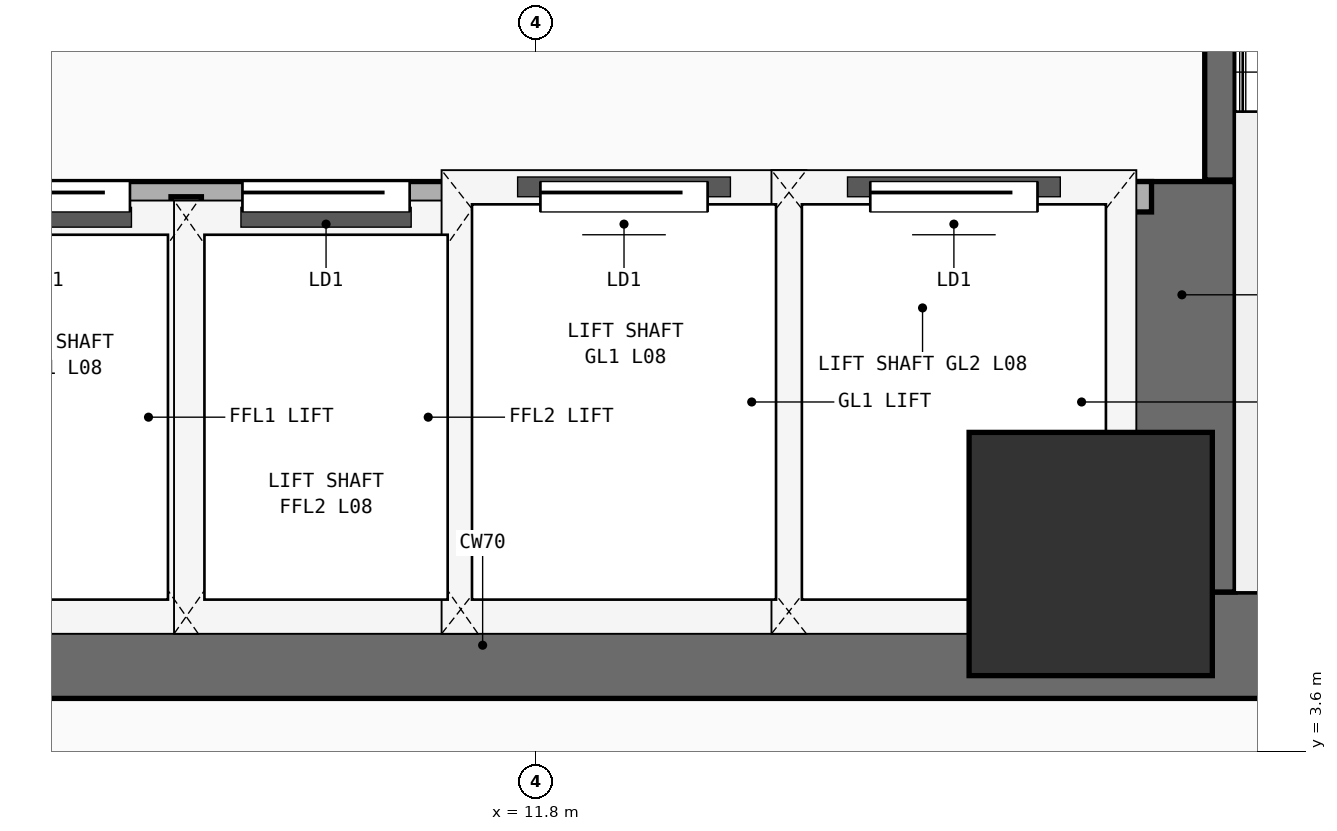
"""IFC4 building model, lengths in metres.
Left out: names, types, materials, properties, quantities, classifications, styles, units other than length and angle.
Written with IfcOpenShell. Run it as: python <this file> out.ifc"""

import sys

from ifc_helpers import new_model, si_unit, direction, frame, frame_2d, origin, origin_2d, place, context, subcontext, project, spatial, rectangle, extrude, element, fill, save


model = new_model("IFC4")
c1 = context("Model", 3, precision=1e-05, world=origin(), true_north=direction((0.0, 1.0)))
c2 = subcontext(c1, "Body", "Model", "MODEL_VIEW")
j1 = project(units=[si_unit("LENGTHUNIT", "METRE"), si_unit("PLANEANGLEUNIT", "RADIAN")], contexts=[c1])
p1 = place(None, origin())
s1 = spatial("IfcSite", under=j1, at=p1, CompositionType="ELEMENT")
p2 = place(p1, origin())
s2 = spatial("IfcBuilding", under=s1, at=p2, CompositionType="ELEMENT")
p3 = place(p2, frame((0.0, 0.0, 33.4)))
s3 = spatial("IfcBuildingStorey", under=s2, at=p3, CompositionType="ELEMENT", Elevation=33.4)
p4 = place(p3, frame((7.1, 4.3, 0.0), z_axis=(0.0, 0.0, 1.0), x_axis=(1.0, 0.0, 0.0)))
e1 = element("IfcWall", 1, at=p4, inside=s3, PredefinedType="SHEAR", context=c2, shape_type="SweptSolid", body=[
    extrude(rectangle(XDim=14.05, YDim=0.7, at=frame_2d((7.025, 0.0))), origin(), (0.0, 0.0, 1.0), 3.54),
])
p5 = place(p3, frame((16.05, 4.65, 0.0), z_axis=(0.0, 0.0, 1.0), x_axis=(0.0, 1.0, 0.0)))
e2 = element("IfcWall", 2, at=p5, inside=s3, PredefinedType="SHEAR", context=c2, shape_type="SweptSolid", body=[
    extrude(rectangle(XDim=2.7, YDim=0.7, at=frame_2d((1.35, 0.0))), origin(), (0.0, 0.0, 1.0), 3.54),
])
p6 = place(p3, frame((15.45, 4.9, 0.0), z_axis=(0.0, 0.0, 1.0), x_axis=(1.0, 0.0, 0.0)))
e3 = element("IfcColumn", 3, at=p6, inside=s3, PredefinedType="COLUMN", context=c2, shape_type="SweptSolid", body=[
    extrude(rectangle(XDim=1.6, YDim=1.6, at=origin_2d()), origin(), (0.0, 0.0, 1.0), 3.54),
])
p7 = place(p3, frame((16.3, 7.36, 0.0), z_axis=(0.0, 0.0, 1.0), x_axis=(0.0, 1.0, 0.0)))
e4 = element("IfcWall", 4, at=p7, inside=s3, PredefinedType="SHEAR", context=c2, shape_type="SweptSolid", body=[
    extrude(rectangle(XDim=2.58, YDim=0.2, at=frame_2d((1.29, 0.0))), origin(), (0.0, 0.0, 1.0), 3.54),
])
p8 = place(p3, frame((7.5, 7.25, 0.0), z_axis=(0.0, 0.0, 1.0), x_axis=(1.0, 0.0, 0.0)))
e5 = element("IfcWall", 5, at=p8, inside=s3, PredefinedType="PARTITIONING", context=c2, shape_type="SweptSolid", body=[
    extrude(rectangle(XDim=8.35, YDim=0.2, at=frame_2d((4.175, 0.0))), origin(), (0.0, 0.0, 1.0), 3.54),
])
p9 = place(p8, frame((0.53, 0.0, 0.0)))
e6 = element("IfcOpeningElement", 6, at=p9, cuts=e5, PredefinedType="OPENING", context=c2, shape_type="SweptSolid", body=[
    extrude(rectangle(XDim=1.1, YDim=2.2, at=frame_2d((0.55, 1.1))), frame((0.0, 0.11, 0.0), z_axis=(0.0, -1.0, 0.0), x_axis=(1.0, 0.0, 0.0)), (0.0, 0.0, 1.0), 0.22),
])
p10 = place(p8, frame((2.37, 0.0, 0.0)))
e7 = element("IfcOpeningElement", 7, at=p10, cuts=e5, PredefinedType="OPENING", context=c2, shape_type="SweptSolid", body=[
    extrude(rectangle(XDim=1.1, YDim=2.2, at=frame_2d((0.55, 1.1))), frame((0.0, 0.11, 0.0), z_axis=(0.0, -1.0, 0.0), x_axis=(1.0, 0.0, 0.0)), (0.0, 0.0, 1.0), 0.22),
])
p11 = place(p8, frame((4.33, 0.0, 0.0)))
e8 = element("IfcOpeningElement", 8, at=p11, cuts=e5, PredefinedType="OPENING", context=c2, shape_type="SweptSolid", body=[
    extrude(rectangle(XDim=1.1, YDim=2.2, at=frame_2d((0.55, 1.1))), frame((0.0, 0.11, 0.0), z_axis=(0.0, -1.0, 0.0), x_axis=(1.0, 0.0, 0.0)), (0.0, 0.0, 1.0), 0.22),
])
p12 = place(p8, frame((6.5, 0.0, 0.0)))
e9 = element("IfcOpeningElement", 9, at=p12, cuts=e5, PredefinedType="OPENING", context=c2, shape_type="SweptSolid", body=[
    extrude(rectangle(XDim=1.1, YDim=2.2, at=frame_2d((0.55, 1.1))), frame((0.0, 0.11, 0.0), z_axis=(0.0, -1.0, 0.0), x_axis=(1.0, 0.0, 0.0)), (0.0, 0.0, 1.0), 0.22),
])
for number, where, z_axis, x_axis in (
    (10, (9.5, 4.45, 0.0), (0.0, 0.0, 1.0), (0.0, 1.0, 0.0)),
    (11, (11.36, 4.45, 0.0), (0.0, 0.0, 1.0), (0.0, 1.0, 0.0)),
    (12, (13.46, 4.45, 0.0), (0.0, 0.0, 1.0), (0.0, 1.0, 0.0)),
):
    element("IfcWall", number, at=place(p3, frame(where, z_axis=z_axis, x_axis=x_axis)), inside=s3, PredefinedType="PARTITIONING", context=c2, shape_type="SweptSolid", body=[
        extrude(rectangle(XDim=2.8, YDim=0.2, at=frame_2d((1.4, 0.0))), origin(), (0.0, 0.0, 1.0), 3.54),
    ])
p13 = place(p9, origin())
e13 = element("IfcDoor", 13, at=p13, inside=s3, OperationType="SLIDING_TO_LEFT", PredefinedType="DOOR", context=c2, shape_type="SweptSolid", body=[
    extrude(rectangle(XDim=1.1, YDim=2.2, at=frame_2d((0.55, 1.1))), frame((0.0, 0.025, 0.0), z_axis=(0.0, -1.0, 0.0), x_axis=(1.0, 0.0, 0.0)), (0.0, 0.0, 1.0), 0.05),
])
fill(e6, e13)
p14 = place(p10, origin())
e14 = element("IfcDoor", 14, at=p14, inside=s3, OperationType="SLIDING_TO_LEFT", PredefinedType="DOOR", context=c2, shape_type="SweptSolid", body=[
    extrude(rectangle(XDim=1.1, YDim=2.2, at=frame_2d((0.55, 1.1))), frame((0.0, 0.025, 0.0), z_axis=(0.0, -1.0, 0.0), x_axis=(1.0, 0.0, 0.0)), (0.0, 0.0, 1.0), 0.05),
])
fill(e7, e14)
p15 = place(p11, origin())
e15 = element("IfcDoor", 15, at=p15, inside=s3, OperationType="SLIDING_TO_LEFT", PredefinedType="DOOR", context=c2, shape_type="SweptSolid", body=[
    extrude(rectangle(XDim=1.1, YDim=2.2, at=frame_2d((0.55, 1.1))), frame((0.0, 0.025, 0.0), z_axis=(0.0, -1.0, 0.0), x_axis=(1.0, 0.0, 0.0)), (0.0, 0.0, 1.0), 0.05),
])
fill(e8, e15)
p16 = place(p12, origin())
e16 = element("IfcDoor", 16, at=p16, inside=s3, OperationType="SLIDING_TO_LEFT", PredefinedType="DOOR", context=c2, shape_type="SweptSolid", body=[
    extrude(rectangle(XDim=1.1, YDim=2.2, at=frame_2d((0.55, 1.1))), frame((0.0, 0.025, 0.0), z_axis=(0.0, -1.0, 0.0), x_axis=(1.0, 0.0, 0.0)), (0.0, 0.0, 1.0), 0.05),
])
fill(e9, e16)
save(model, sys.argv[1])
